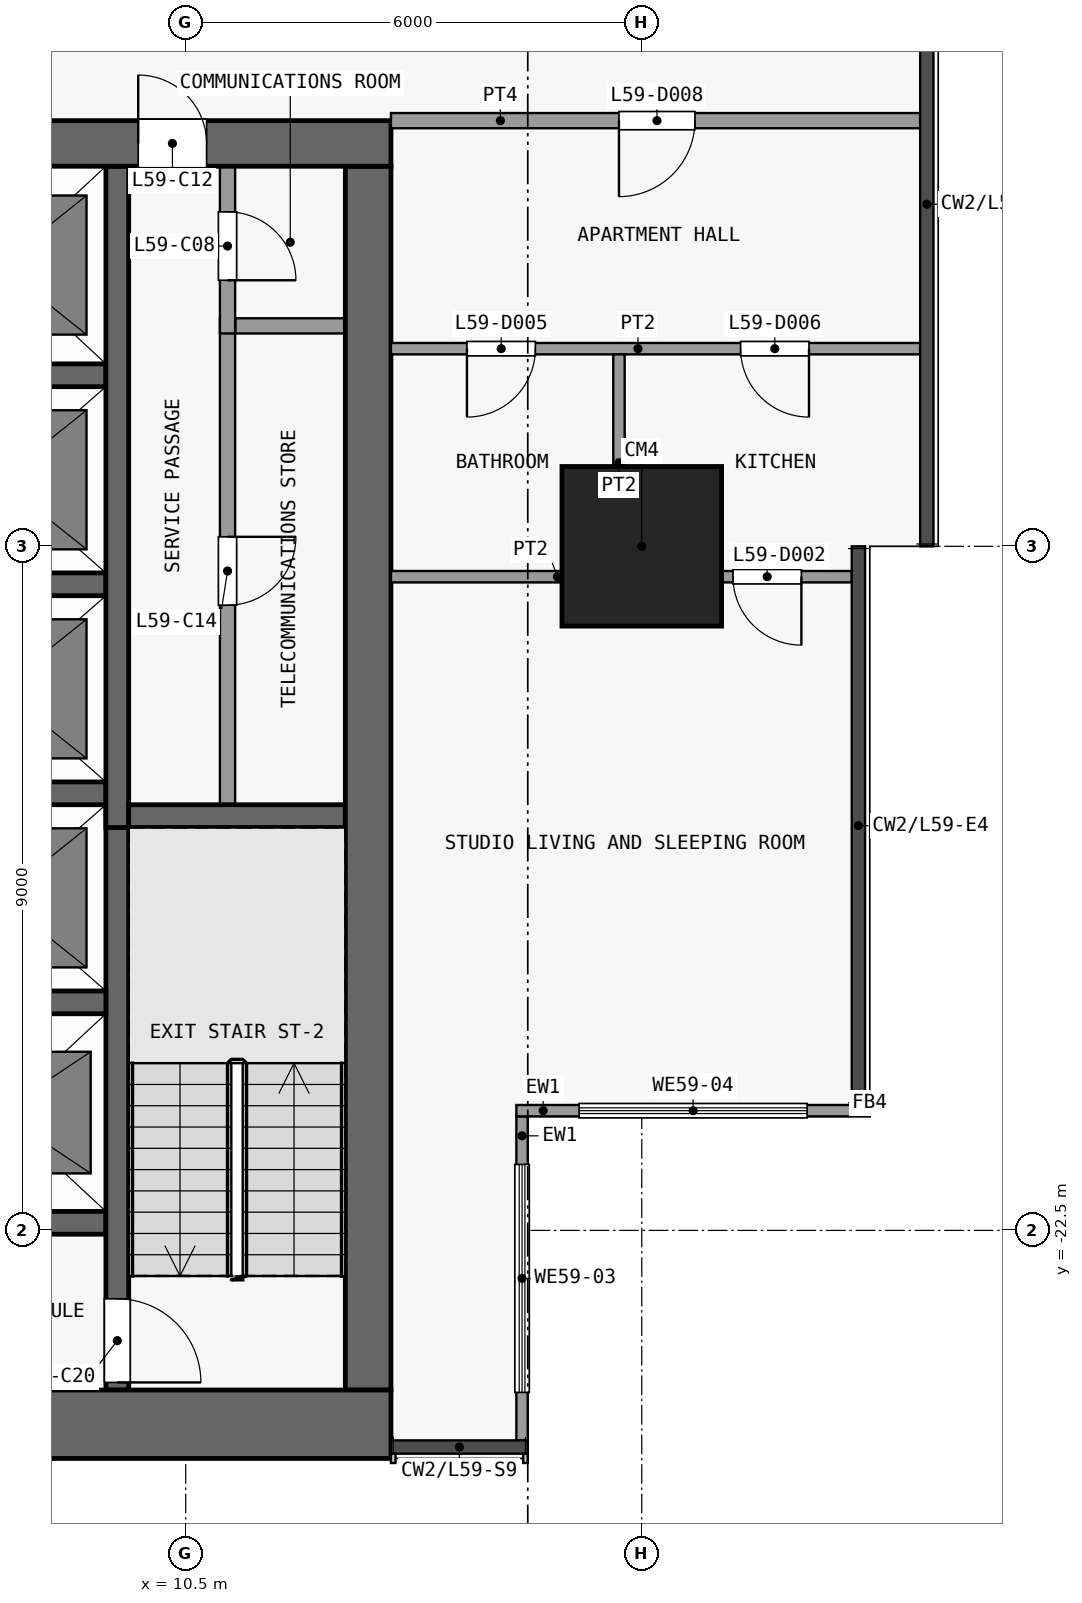
"""IFC4 building model, lengths in metres.
Left out: names, types, materials, properties, quantities, classifications, styles, units other than length and angle.
Written with IfcOpenShell. Run it as: python <this file> out.ifc"""

import sys

from ifc_helpers import new_model, si_unit, direction, frame, frame_2d, origin, origin_2d, place, context, subcontext, project, spatial, rectangle, extrude, element, fill, save


model = new_model("IFC4")
c1 = context("Model", 3, precision=1e-05, world=origin(), true_north=direction((0.0, 1.0)))
c2 = subcontext(c1, "Body", "Model", "MODEL_VIEW")
j1 = project(units=[si_unit("LENGTHUNIT", "METRE"), si_unit("PLANEANGLEUNIT", "RADIAN")], contexts=[c1])
p1 = place(None, origin())
s1 = spatial("IfcSite", under=j1, at=p1, CompositionType="ELEMENT")
p2 = place(p1, origin())
s2 = spatial("IfcBuilding", under=s1, at=p2, CompositionType="ELEMENT")
p3 = place(p2, frame((0.0, 0.0, 233.9)))
s3 = spatial("IfcBuildingStorey", under=s2, at=p3, CompositionType="ELEMENT", Elevation=233.9)
p4 = place(p3, frame((16.5, -13.5, 0.0), z_axis=(0.0, 0.0, 1.0), x_axis=(1.0, 0.0, 0.0)))
e1 = element("IfcColumn", 1, at=p4, inside=s3, PredefinedType="COLUMN", context=c2, shape_type="SweptSolid", body=[
    extrude(rectangle(XDim=2.1, YDim=2.1, at=origin_2d()), origin(), (0.0, 0.0, 1.0), 3.6),
])
p5 = place(p3, frame((-13.2, -25.05, 0.0), z_axis=(0.0, 0.0, 1.0), x_axis=(1.0, 0.0, 0.0)))
e2 = element("IfcWall", 2, at=p5, inside=s3, PredefinedType="SHEAR", context=c2, shape_type="SweptSolid", body=[
    extrude(rectangle(XDim=26.4, YDim=0.9, at=frame_2d((13.2, 0.0))), origin(), (0.0, 0.0, 1.0), 3.3),
])
p6 = place(p3, frame((-13.2, -8.2, 0.0), z_axis=(0.0, 0.0, 1.0), x_axis=(1.0, 0.0, 0.0)))
e3 = element("IfcWall", 3, at=p6, inside=s3, PredefinedType="SHEAR", context=c2, shape_type="SweptSolid", body=[
    extrude(rectangle(XDim=26.4, YDim=0.6, at=frame_2d((13.2, 0.0))), origin(), (0.0, 0.0, 1.0), 3.3),
])
p7 = place(p6, frame((7.5, 0.0, 0.0)))
e4 = element("IfcOpeningElement", 4, at=p7, cuts=e3, PredefinedType="OPENING", context=c2, shape_type="SweptSolid", body=[
    extrude(rectangle(XDim=1.8, YDim=2.1, at=frame_2d((0.9, 1.05))), frame((0.0, 0.31, 0.0), z_axis=(0.0, -1.0, 0.0), x_axis=(1.0, 0.0, 0.0)), (0.0, 0.0, 1.0), 0.62),
])
p8 = place(p6, frame((17.1, 0.0, 0.0)))
e5 = element("IfcOpeningElement", 5, at=p8, cuts=e3, PredefinedType="OPENING", context=c2, shape_type="SweptSolid", body=[
    extrude(rectangle(XDim=1.8, YDim=2.1, at=frame_2d((0.9, 1.05))), frame((0.0, 0.31, 0.0), z_axis=(0.0, -1.0, 0.0), x_axis=(1.0, 0.0, 0.0)), (0.0, 0.0, 1.0), 0.62),
])
p9 = place(p6, frame((2.425, 0.0, 0.0)))
e6 = element("IfcOpeningElement", 6, at=p9, cuts=e3, PredefinedType="OPENING", context=c2, shape_type="SweptSolid", body=[
    extrude(rectangle(XDim=0.9, YDim=2.1, at=frame_2d((0.45, 1.05))), frame((0.0, 0.31, 0.0), z_axis=(0.0, -1.0, 0.0), x_axis=(1.0, 0.0, 0.0)), (0.0, 0.0, 1.0), 0.62),
])
p10 = place(p6, frame((23.075, 0.0, 0.0)))
e7 = element("IfcOpeningElement", 7, at=p10, cuts=e3, PredefinedType="OPENING", context=c2, shape_type="SweptSolid", body=[
    extrude(rectangle(XDim=0.9, YDim=2.1, at=frame_2d((0.45, 1.05))), frame((0.0, 0.31, 0.0), z_axis=(0.0, -1.0, 0.0), x_axis=(1.0, 0.0, 0.0)), (0.0, 0.0, 1.0), 0.62),
])
p11 = place(p3, frame((12.9, -24.6, 0.0), z_axis=(0.0, 0.0, 1.0), x_axis=(0.0, 1.0, 0.0)))
e8 = element("IfcWall", 8, at=p11, inside=s3, PredefinedType="SHEAR", context=c2, shape_type="SweptSolid", body=[
    extrude(rectangle(XDim=16.1, YDim=0.6, at=frame_2d((8.05, 0.0))), origin(), (0.0, 0.0, 1.0), 3.3),
])
for number, where, z_axis, x_axis in (
    (9, (6.65, -22.4, 0.0), (0.0, 0.0, 1.0), (1.0, 0.0, 0.0)),
    (10, (6.65, -19.5, 0.0), (0.0, 0.0, 1.0), (1.0, 0.0, 0.0)),
):
    element("IfcWall", number, at=place(p3, frame(where, z_axis=z_axis, x_axis=x_axis)), inside=s3, PredefinedType="SHEAR", context=c2, shape_type="SweptSolid", body=[
        extrude(rectangle(XDim=2.8, YDim=0.3, at=frame_2d((1.4, 0.0))), origin(), (0.0, 0.0, 1.0), 3.3),
    ])
p12 = place(p3, frame((9.75, -17.05, 0.0), z_axis=(0.0, 0.0, 1.0), x_axis=(1.0, 0.0, 0.0)))
e11 = element("IfcWall", 11, at=p12, inside=s3, PredefinedType="SHEAR", context=c2, shape_type="SweptSolid", body=[
    extrude(rectangle(XDim=2.85, YDim=0.3, at=frame_2d((1.425, 0.0))), origin(), (0.0, 0.0, 1.0), 3.3),
])
for number, where, z_axis, x_axis in (
    (12, (6.65, -16.75, 0.0), (0.0, 0.0, 1.0), (1.0, 0.0, 0.0)),
    (13, (6.65, -14.0, 0.0), (0.0, 0.0, 1.0), (1.0, 0.0, 0.0)),
    (14, (6.65, -11.25, 0.0), (0.0, 0.0, 1.0), (1.0, 0.0, 0.0)),
):
    element("IfcWall", number, at=place(p3, frame(where, z_axis=z_axis, x_axis=x_axis)), inside=s3, PredefinedType="SHEAR", context=c2, shape_type="SweptSolid", body=[
        extrude(rectangle(XDim=2.8, YDim=0.3, at=frame_2d((1.4, 0.0))), origin(), (0.0, 0.0, 1.0), 3.3),
    ])
p13 = place(p3, frame((11.15, -10.6, 0.0), z_axis=(0.0, 0.0, 1.0), x_axis=(1.0, 0.0, 0.0)))
e15 = element("IfcWall", 15, at=p13, inside=s3, PredefinedType="PARTITIONING", context=c2, shape_type="SweptSolid", body=[
    extrude(rectangle(XDim=1.45, YDim=0.2, at=frame_2d((0.725, 0.0))), origin(), (0.0, 0.0, 1.0), 3.3),
])
p14 = place(p3, frame((9.6, -16.9, 0.0), z_axis=(0.0, 0.0, 1.0), x_axis=(0.0, -1.0, 0.0)))
e16 = element("IfcWall", 16, at=p14, inside=s3, PredefinedType="SHEAR", context=c2, shape_type="SweptSolid", body=[
    extrude(rectangle(XDim=7.7, YDim=0.3, at=frame_2d((3.85, 0.0))), origin(), (0.0, 0.0, 1.0), 3.3),
])
p15 = place(p14, frame((6.5, 0.0, 0.0)))
e17 = element("IfcOpeningElement", 17, at=p15, cuts=e16, PredefinedType="OPENING", context=c2, shape_type="SweptSolid", body=[
    extrude(rectangle(XDim=1.1, YDim=2.1, at=frame_2d((0.55, 1.05))), frame((0.0, 0.16, 0.0), z_axis=(0.0, -1.0, 0.0), x_axis=(1.0, 0.0, 0.0)), (0.0, 0.0, 1.0), 0.32),
])
p16 = place(p3, frame((9.6, -17.2, 0.0), z_axis=(0.0, 0.0, 1.0), x_axis=(0.0, 1.0, 0.0)))
e18 = element("IfcWall", 18, at=p16, inside=s3, PredefinedType="SHEAR", context=c2, shape_type="SweptSolid", body=[
    extrude(rectangle(XDim=8.7, YDim=0.3, at=frame_2d((4.35, 0.0))), origin(), (0.0, 0.0, 1.0), 3.3),
])
p17 = place(p3, frame((11.05, -10.5, 0.0), z_axis=(0.0, 0.0, 1.0), x_axis=(0.0, -1.0, 0.0)))
e19 = element("IfcWall", 19, at=p17, inside=s3, PredefinedType="PARTITIONING", context=c2, shape_type="SweptSolid", body=[
    extrude(rectangle(XDim=6.4, YDim=0.2, at=frame_2d((3.2, 0.0))), origin(), (0.0, 0.0, 1.0), 3.3),
])
p18 = place(p17, frame((2.875, 0.0, 0.0)))
e20 = element("IfcOpeningElement", 20, at=p18, cuts=e19, PredefinedType="OPENING", context=c2, shape_type="SweptSolid", body=[
    extrude(rectangle(XDim=0.9, YDim=2.1, at=frame_2d((0.45, 1.05))), frame((0.0, 0.11, 0.0), z_axis=(0.0, -1.0, 0.0), x_axis=(1.0, 0.0, 0.0)), (0.0, 0.0, 1.0), 0.22),
])
p19 = place(p3, frame((11.05, -8.5, 0.0), z_axis=(0.0, 0.0, 1.0), x_axis=(0.0, -1.0, 0.0)))
e21 = element("IfcWall", 21, at=p19, inside=s3, PredefinedType="PARTITIONING", context=c2, shape_type="SweptSolid", body=[
    extrude(rectangle(XDim=2.2, YDim=0.2, at=frame_2d((1.1, 0.0))), origin(), (0.0, 0.0, 1.0), 3.3),
])
p20 = place(p19, frame((0.6, 0.0, 0.0)))
e22 = element("IfcOpeningElement", 22, at=p20, cuts=e21, PredefinedType="OPENING", context=c2, shape_type="SweptSolid", body=[
    extrude(rectangle(XDim=0.9, YDim=2.1, at=frame_2d((0.45, 1.05))), frame((0.0, 0.11, 0.0), z_axis=(0.0, -1.0, 0.0), x_axis=(1.0, 0.0, 0.0)), (0.0, 0.0, 1.0), 0.22),
])
p21 = place(p3, frame((14.925, -21.0, 0.0), z_axis=(0.0, 0.0, 1.0), x_axis=(0.0, -1.0, 0.0)))
e23 = element("IfcWall", 23, at=p21, inside=s3, PredefinedType="SOLIDWALL", context=c2, shape_type="SweptSolid", body=[
    extrude(rectangle(XDim=4.262, YDim=0.15, at=frame_2d((2.131, 0.0))), origin(), (0.0, 0.0, 1.0), 3.3),
])
p22 = place(p21, frame((0.631, 0.0, 0.9)))
e24 = element("IfcOpeningElement", 24, at=p22, cuts=e23, PredefinedType="OPENING", context=c2, shape_type="SweptSolid", body=[
    extrude(rectangle(XDim=3.0, YDim=2.4, at=frame_2d((1.5, 1.2))), frame((0.0, 0.085, 0.0), z_axis=(0.0, -1.0, 0.0), x_axis=(1.0, 0.0, 0.0)), (0.0, 0.0, 1.0), 0.17),
])
p23 = place(p3, frame((19.5, -20.925, 0.0), z_axis=(0.0, 0.0, 1.0), x_axis=(-1.0, 0.0, 0.0)))
e25 = element("IfcWall", 25, at=p23, inside=s3, PredefinedType="SOLIDWALL", context=c2, shape_type="SweptSolid", body=[
    extrude(rectangle(XDim=4.65, YDim=0.15, at=frame_2d((2.325, 0.0))), origin(), (0.0, 0.0, 1.0), 3.3),
])
p24 = place(p23, frame((0.825, 0.0, 0.9)))
e26 = element("IfcOpeningElement", 26, at=p24, cuts=e25, PredefinedType="OPENING", context=c2, shape_type="SweptSolid", body=[
    extrude(rectangle(XDim=3.0, YDim=2.4, at=frame_2d((1.5, 1.2))), frame((0.0, 0.085, 0.0), z_axis=(0.0, -1.0, 0.0), x_axis=(1.0, 0.0, 0.0)), (0.0, 0.0, 1.0), 0.17),
])
p25 = place(p3, frame((13.2, -13.9, 0.0), z_axis=(0.0, 0.0, 1.0), x_axis=(1.0, 0.0, 0.0)))
e27 = element("IfcWall", 27, at=p25, inside=s3, PredefinedType="PARTITIONING", context=c2, shape_type="SweptSolid", body=[
    extrude(rectangle(XDim=6.062, YDim=0.15, at=frame_2d((3.031, 0.0))), origin(), (0.0, 0.0, 1.0), 3.3),
])
p26 = place(p25, frame((4.5, 0.0, 0.0)))
e28 = element("IfcOpeningElement", 28, at=p26, cuts=e27, PredefinedType="OPENING", context=c2, shape_type="SweptSolid", body=[
    extrude(rectangle(XDim=0.9, YDim=2.1, at=frame_2d((0.45, 1.05))), frame((0.0, 0.085, 0.0), z_axis=(0.0, -1.0, 0.0), x_axis=(1.0, 0.0, 0.0)), (0.0, 0.0, 1.0), 0.17),
])
p27 = place(p3, frame((13.2, -10.9, 0.0), z_axis=(0.0, 0.0, 1.0), x_axis=(1.0, 0.0, 0.0)))
e29 = element("IfcWall", 29, at=p27, inside=s3, PredefinedType="PARTITIONING", context=c2, shape_type="SweptSolid", body=[
    extrude(rectangle(XDim=6.963, YDim=0.15, at=frame_2d((3.481, 0.0))), origin(), (0.0, 0.0, 1.0), 3.3),
])
p28 = place(p27, frame((1.0, 0.0, 0.0)))
e30 = element("IfcOpeningElement", 30, at=p28, cuts=e29, PredefinedType="OPENING", context=c2, shape_type="SweptSolid", body=[
    extrude(rectangle(XDim=0.9, YDim=2.1, at=frame_2d((0.45, 1.05))), frame((0.0, 0.085, 0.0), z_axis=(0.0, -1.0, 0.0), x_axis=(1.0, 0.0, 0.0)), (0.0, 0.0, 1.0), 0.17),
])
p29 = place(p27, frame((4.6, 0.0, 0.0)))
e31 = element("IfcOpeningElement", 31, at=p29, cuts=e29, PredefinedType="OPENING", context=c2, shape_type="SweptSolid", body=[
    extrude(rectangle(XDim=0.9, YDim=2.1, at=frame_2d((0.45, 1.05))), frame((0.0, 0.085, 0.0), z_axis=(0.0, -1.0, 0.0), x_axis=(1.0, 0.0, 0.0)), (0.0, 0.0, 1.0), 0.17),
])
p30 = place(p3, frame((13.2, -7.9, 0.0), z_axis=(0.0, 0.0, 1.0), x_axis=(1.0, 0.0, 0.0)))
e32 = element("IfcWall", 32, at=p30, inside=s3, PredefinedType="PARTITIONING", context=c2, shape_type="SweptSolid", body=[
    extrude(rectangle(XDim=6.963, YDim=0.2, at=frame_2d((3.481, 0.0))), origin(), (0.0, 0.0, 1.0), 3.3),
])
p31 = place(p30, frame((3.0, 0.0, 0.0)))
e33 = element("IfcOpeningElement", 33, at=p31, cuts=e32, PredefinedType="OPENING", context=c2, shape_type="SweptSolid", body=[
    extrude(rectangle(XDim=1.0, YDim=2.1, at=frame_2d((0.5, 1.05))), frame((0.0, 0.11, 0.0), z_axis=(0.0, -1.0, 0.0), x_axis=(1.0, 0.0, 0.0)), (0.0, 0.0, 1.0), 0.22),
])
p32 = place(p3, frame((16.2, -13.825, 0.0), z_axis=(0.0, 0.0, 1.0), x_axis=(0.0, 1.0, 0.0)))
e34 = element("IfcWall", 34, at=p32, inside=s3, PredefinedType="PARTITIONING", context=c2, shape_type="SweptSolid", body=[
    extrude(rectangle(XDim=2.85, YDim=0.15, at=frame_2d((1.425, 0.0))), origin(), (0.0, 0.0, 1.0), 3.3),
])
p33 = place(p20, origin())
e35 = element("IfcDoor", 35, at=p33, inside=s3, OperationType="SINGLE_SWING_RIGHT", PredefinedType="DOOR", context=c2, shape_type="SweptSolid", body=[
    extrude(rectangle(XDim=0.9, YDim=2.1, at=frame_2d((0.45, 1.05))), frame((0.0, 0.025, 0.0), z_axis=(0.0, -1.0, 0.0), x_axis=(1.0, 0.0, 0.0)), (0.0, 0.0, 1.0), 0.05),
])
fill(e22, e35)
p34 = place(p10, origin())
e36 = element("IfcDoor", 36, at=p34, inside=s3, OperationType="SINGLE_SWING_LEFT", PredefinedType="DOOR", context=c2, shape_type="SweptSolid", body=[
    extrude(rectangle(XDim=0.9, YDim=2.1, at=frame_2d((0.45, 1.05))), frame((0.0, 0.025, 0.0), z_axis=(0.0, -1.0, 0.0), x_axis=(1.0, 0.0, 0.0)), (0.0, 0.0, 1.0), 0.05),
])
fill(e7, e36)
p35 = place(p18, origin())
e37 = element("IfcDoor", 37, at=p35, inside=s3, OperationType="SINGLE_SWING_LEFT", PredefinedType="DOOR", context=c2, shape_type="SweptSolid", body=[
    extrude(rectangle(XDim=0.9, YDim=2.1, at=frame_2d((0.45, 1.05))), frame((0.0, 0.025, 0.0), z_axis=(0.0, -1.0, 0.0), x_axis=(1.0, 0.0, 0.0)), (0.0, 0.0, 1.0), 0.05),
])
fill(e20, e37)
p36 = place(p15, origin())
e38 = element("IfcDoor", 38, at=p36, inside=s3, OperationType="SINGLE_SWING_RIGHT", PredefinedType="DOOR", context=c2, shape_type="SweptSolid", body=[
    extrude(rectangle(XDim=1.1, YDim=2.1, at=frame_2d((0.55, 1.05))), frame((0.0, 0.025, 0.0), z_axis=(0.0, -1.0, 0.0), x_axis=(1.0, 0.0, 0.0)), (0.0, 0.0, 1.0), 0.05),
])
fill(e17, e38)
p37 = place(p22, origin())
e39 = element("IfcWindow", 39, at=p37, inside=s3, PartitioningType="SINGLE_PANEL", PredefinedType="WINDOW", context=c2, shape_type="SweptSolid", body=[
    extrude(rectangle(XDim=3.0, YDim=2.4, at=frame_2d((1.5, 1.2))), frame((0.0, 0.03, 0.0), z_axis=(0.0, -1.0, 0.0), x_axis=(1.0, 0.0, 0.0)), (0.0, 0.0, 1.0), 0.06),
])
fill(e24, e39)
p38 = place(p24, origin())
e40 = element("IfcWindow", 40, at=p38, inside=s3, PartitioningType="SINGLE_PANEL", PredefinedType="WINDOW", context=c2, shape_type="SweptSolid", body=[
    extrude(rectangle(XDim=3.0, YDim=2.4, at=frame_2d((1.5, 1.2))), frame((0.0, 0.03, 0.0), z_axis=(0.0, -1.0, 0.0), x_axis=(1.0, 0.0, 0.0)), (0.0, 0.0, 1.0), 0.06),
])
fill(e26, e40)
p39 = place(p26, origin())
e41 = element("IfcDoor", 41, at=p39, inside=s3, OperationType="SINGLE_SWING_RIGHT", PredefinedType="DOOR", context=c2, shape_type="SweptSolid", body=[
    extrude(rectangle(XDim=0.9, YDim=2.1, at=frame_2d((0.45, 1.05))), frame((0.0, 0.025, 0.0), z_axis=(0.0, -1.0, 0.0), x_axis=(1.0, 0.0, 0.0)), (0.0, 0.0, 1.0), 0.05),
])
fill(e28, e41)
p40 = place(p28, origin())
e42 = element("IfcDoor", 42, at=p40, inside=s3, OperationType="SINGLE_SWING_LEFT", PredefinedType="DOOR", context=c2, shape_type="SweptSolid", body=[
    extrude(rectangle(XDim=0.9, YDim=2.1, at=frame_2d((0.45, 1.05))), frame((0.0, 0.025, 0.0), z_axis=(0.0, -1.0, 0.0), x_axis=(1.0, 0.0, 0.0)), (0.0, 0.0, 1.0), 0.05),
])
fill(e30, e42)
p41 = place(p29, origin())
e43 = element("IfcDoor", 43, at=p41, inside=s3, OperationType="SINGLE_SWING_RIGHT", PredefinedType="DOOR", context=c2, shape_type="SweptSolid", body=[
    extrude(rectangle(XDim=0.9, YDim=2.1, at=frame_2d((0.45, 1.05))), frame((0.0, 0.025, 0.0), z_axis=(0.0, -1.0, 0.0), x_axis=(1.0, 0.0, 0.0)), (0.0, 0.0, 1.0), 0.05),
])
fill(e31, e43)
p42 = place(p31, origin())
e44 = element("IfcDoor", 44, at=p42, inside=s3, OperationType="SINGLE_SWING_LEFT", PredefinedType="DOOR", context=c2, shape_type="SweptSolid", body=[
    extrude(rectangle(XDim=1.0, YDim=2.1, at=frame_2d((0.5, 1.05))), frame((0.0, 0.025, 0.0), z_axis=(0.0, -1.0, 0.0), x_axis=(1.0, 0.0, 0.0)), (0.0, 0.0, 1.0), 0.05),
])
fill(e33, e44)
save(model, sys.argv[1])
